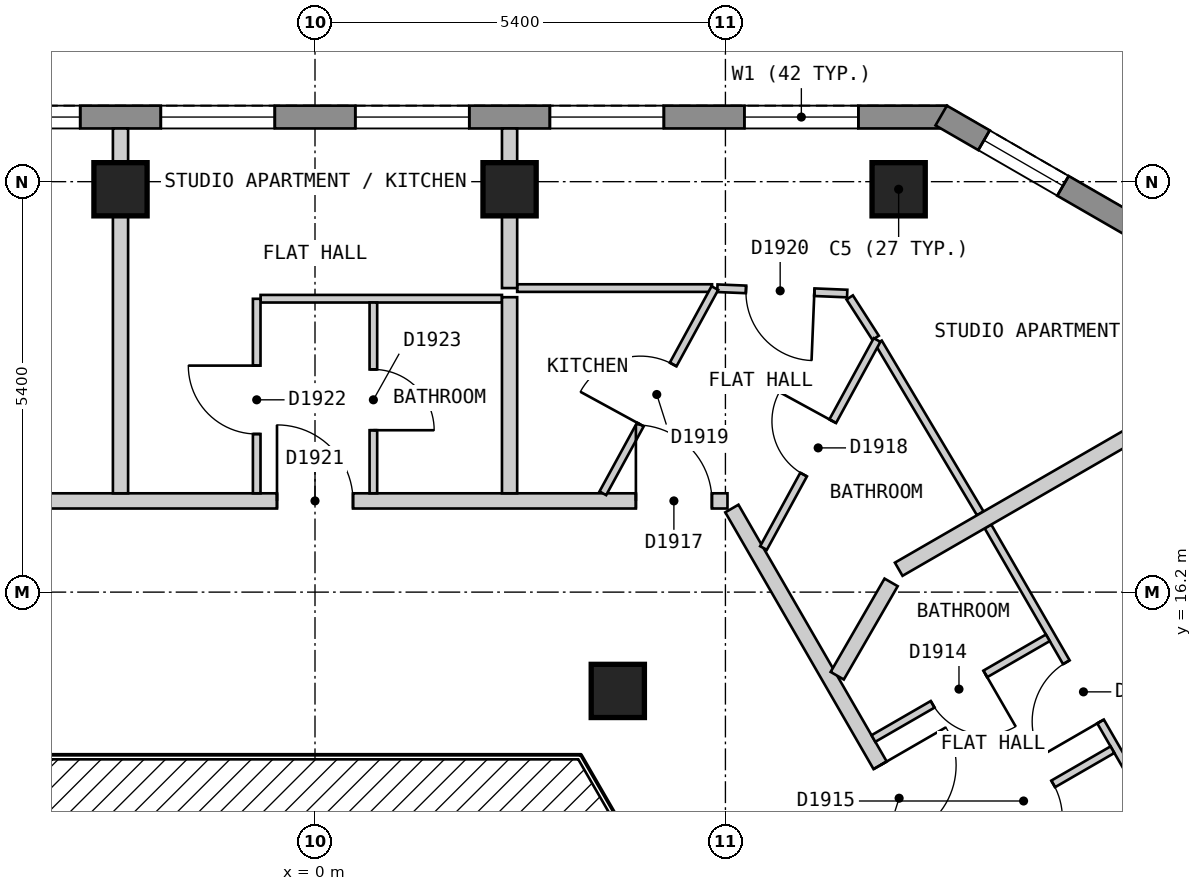
"""IFC4 building model, lengths in metres.
Left out: names, types, materials, properties, quantities, classifications, styles, units other than length and angle.
Written with IfcOpenShell. Run it as: python <this file> out.ifc"""

import sys

from ifc_helpers import new_model, si_unit, direction, frame, frame_2d, origin, origin_2d, place, context, subcontext, project, spatial, polyline, rectangle, outline, extrude, element, fill, save


model = new_model("IFC4")
c1 = context("Model", 3, precision=1e-05, world=origin(), true_north=direction((0.0, 1.0)))
c2 = subcontext(c1, "Body", "Model", "MODEL_VIEW")
j1 = project(units=[si_unit("LENGTHUNIT", "METRE"), si_unit("PLANEANGLEUNIT", "RADIAN")], contexts=[c1])
p1 = place(None, origin())
s1 = spatial("IfcSite", under=j1, at=p1, CompositionType="ELEMENT")
p2 = place(p1, origin())
s2 = spatial("IfcBuilding", under=s1, at=p2, CompositionType="ELEMENT")
p3 = place(p2, frame((0.0, 0.0, 220.8)))
s3 = spatial("IfcBuildingStorey", under=s2, at=p3, CompositionType="ELEMENT", Elevation=220.8)
for number, where, z_axis, x_axis in (
    (1, (7.679, 21.5, 0.0), (0.0, 0.0, 1.0), (-1.0, 0.0, 0.0)),
    (2, (2.56, 21.5, 0.0), (0.0, 0.0, 1.0), (-1.0, 0.0, 0.0)),
    (3, (-2.559, 21.5, 0.0), (0.0, 0.0, 1.0), (-1.0, 0.0, 0.0)),
    (4, (3.984, 14.9, 0.0), (0.0, 0.0, 1.0), (1.0, 0.0, 0.0)),
):
    element("IfcColumn", number, at=place(p3, frame(where, z_axis=z_axis, x_axis=x_axis)), inside=s3, PredefinedType="COLUMN", context=c2, shape_type="SweptSolid", body=[
        extrude(rectangle(XDim=0.7, YDim=0.7, at=origin_2d()), origin(), (0.0, 0.0, 1.0), 3.0),
    ])
p4 = place(p3, frame((8.314, 22.45, 0.0), z_axis=(0.0, 0.0, 1.0), x_axis=(-1.0, 0.0, 0.0)))
e5 = element("IfcWall", 5, at=p4, inside=s3, PredefinedType="SOLIDWALL", context=c2, shape_type="SweptSolid", body=[
    extrude(outline(polyline([(0.0, -0.15), (16.628, -0.15), (16.548, 0.15), (0.08, 0.15), (0.0, -0.15)])), origin(), (0.0, 0.0, 1.0), 2.7),
])
p5 = place(p4, frame((1.165, 0.0, 0.15)))
e6 = element("IfcOpeningElement", 6, at=p5, cuts=e5, PredefinedType="OPENING", context=c2, shape_type="SweptSolid", body=[
    extrude(rectangle(XDim=1.5, YDim=2.1, at=frame_2d((0.75, 1.05))), frame((0.0, 0.16, 0.0), z_axis=(0.0, -1.0, 0.0), x_axis=(1.0, 0.0, 0.0)), (0.0, 0.0, 1.0), 0.32),
])
p6 = place(p4, frame((3.724, 0.0, 0.15)))
e7 = element("IfcOpeningElement", 7, at=p6, cuts=e5, PredefinedType="OPENING", context=c2, shape_type="SweptSolid", body=[
    extrude(rectangle(XDim=1.5, YDim=2.1, at=frame_2d((0.75, 1.05))), frame((0.0, 0.16, 0.0), z_axis=(0.0, -1.0, 0.0), x_axis=(1.0, 0.0, 0.0)), (0.0, 0.0, 1.0), 0.32),
])
p7 = place(p4, frame((6.284, 0.0, 0.15)))
e8 = element("IfcOpeningElement", 8, at=p7, cuts=e5, PredefinedType="OPENING", context=c2, shape_type="SweptSolid", body=[
    extrude(rectangle(XDim=1.5, YDim=2.1, at=frame_2d((0.75, 1.05))), frame((0.0, 0.16, 0.0), z_axis=(0.0, -1.0, 0.0), x_axis=(1.0, 0.0, 0.0)), (0.0, 0.0, 1.0), 0.32),
])
p8 = place(p4, frame((8.843, 0.0, 0.15)))
e9 = element("IfcOpeningElement", 9, at=p8, cuts=e5, PredefinedType="OPENING", context=c2, shape_type="SweptSolid", body=[
    extrude(rectangle(XDim=1.5, YDim=2.1, at=frame_2d((0.75, 1.05))), frame((0.0, 0.16, 0.0), z_axis=(0.0, -1.0, 0.0), x_axis=(1.0, 0.0, 0.0)), (0.0, 0.0, 1.0), 0.32),
])
p9 = place(p4, frame((11.403, 0.0, 0.15)))
e10 = element("IfcOpeningElement", 10, at=p9, cuts=e5, PredefinedType="OPENING", context=c2, shape_type="SweptSolid", body=[
    extrude(rectangle(XDim=1.5, YDim=2.1, at=frame_2d((0.75, 1.05))), frame((0.0, 0.16, 0.0), z_axis=(0.0, -1.0, 0.0), x_axis=(1.0, 0.0, 0.0)), (0.0, 0.0, 1.0), 0.32),
])
p10 = place(p4, frame((13.962, 0.0, 0.15)))
e11 = element("IfcOpeningElement", 11, at=p10, cuts=e5, PredefinedType="OPENING", context=c2, shape_type="SweptSolid", body=[
    extrude(rectangle(XDim=1.5, YDim=2.1, at=frame_2d((0.75, 1.05))), frame((0.0, 0.16, 0.0), z_axis=(0.0, -1.0, 0.0), x_axis=(1.0, 0.0, 0.0)), (0.0, 0.0, 1.0), 0.32),
])
p11 = place(p3, frame((12.569, 19.97, 0.0), z_axis=(0.0, 0.0, 1.0), x_axis=(-0.866022959057, 0.500004234368, 0.0)))
e12 = element("IfcWall", 12, at=p11, inside=s3, PredefinedType="SOLIDWALL", context=c2, shape_type="SweptSolid", body=[
    extrude(outline(polyline([(0.0, -0.15), (5.0, -0.15), (4.92, 0.15), (0.08, 0.15), (0.0, -0.15)])), origin(), (0.0, 0.0, 1.0), 2.7),
])
p12 = place(p11, frame((0.65, 0.0, 0.15)))
e13 = element("IfcOpeningElement", 13, at=p12, cuts=e12, PredefinedType="OPENING", context=c2, shape_type="SweptSolid", body=[
    extrude(rectangle(XDim=1.2, YDim=2.1, at=frame_2d((0.6, 1.05))), frame((0.0, 0.16, 0.0), z_axis=(0.0, -1.0, 0.0), x_axis=(1.0, 0.0, 0.0)), (0.0, 0.0, 1.0), 0.32),
])
p13 = place(p11, frame((3.15, 0.0, 0.15)))
e14 = element("IfcOpeningElement", 14, at=p13, cuts=e12, PredefinedType="OPENING", context=c2, shape_type="SweptSolid", body=[
    extrude(rectangle(XDim=1.2, YDim=2.1, at=frame_2d((0.6, 1.05))), frame((0.0, 0.16, 0.0), z_axis=(0.0, -1.0, 0.0), x_axis=(1.0, 0.0, 0.0)), (0.0, 0.0, 1.0), 0.32),
])
p14 = place(p3, frame((5.485, 17.3, 0.0), z_axis=(0.0, 0.0, 1.0), x_axis=(0.499943285704, -0.866058145322, 0.0)))
e15 = element("IfcWall", 15, at=p14, inside=s3, PredefinedType="PARTITIONING", context=c2, shape_type="SweptSolid", body=[
    extrude(rectangle(XDim=10.623, YDim=0.2, at=frame_2d((5.312, 0.0))), origin(), (0.0, 0.0, 1.0), 2.7),
])
p15 = place(p14, frame((3.901, 0.0, 0.0)))
e16 = element("IfcOpeningElement", 16, at=p15, cuts=e15, PredefinedType="OPENING", context=c2, shape_type="SweptSolid", body=[
    extrude(rectangle(XDim=1.0, YDim=2.1, at=frame_2d((0.5, 1.05))), frame((0.0, 0.11, 0.0), z_axis=(0.0, -1.0, 0.0), x_axis=(1.0, 0.0, 0.0)), (0.0, 0.0, 1.0), 0.22),
])
p16 = place(p3, frame((-5.312, 17.4, 0.0), z_axis=(0.0, 0.0, 1.0), x_axis=(1.0, 0.0, 0.0)))
e17 = element("IfcWall", 17, at=p16, inside=s3, PredefinedType="PARTITIONING", context=c2, shape_type="SweptSolid", body=[
    extrude(rectangle(XDim=10.739, YDim=0.2, at=frame_2d((5.37, 0.0))), origin(), (0.0, 0.0, 1.0), 2.7),
])
p17 = place(p16, frame((9.534, 0.0, 0.0)))
e18 = element("IfcOpeningElement", 18, at=p17, cuts=e17, PredefinedType="OPENING", context=c2, shape_type="SweptSolid", body=[
    extrude(rectangle(XDim=1.0, YDim=2.1, at=frame_2d((0.5, 1.05))), frame((0.0, 0.11, 0.0), z_axis=(0.0, -1.0, 0.0), x_axis=(1.0, 0.0, 0.0)), (0.0, 0.0, 1.0), 0.22),
])
p18 = place(p16, frame((4.812, 0.0, 0.0)))
e19 = element("IfcOpeningElement", 19, at=p18, cuts=e17, PredefinedType="OPENING", context=c2, shape_type="SweptSolid", body=[
    extrude(rectangle(XDim=1.0, YDim=2.1, at=frame_2d((0.5, 1.05))), frame((0.0, 0.11, 0.0), z_axis=(0.0, -1.0, 0.0), x_axis=(1.0, 0.0, 0.0)), (0.0, 0.0, 1.0), 0.22),
])
p19 = place(p16, frame((0.208, 0.0, 0.0)))
e20 = element("IfcOpeningElement", 20, at=p19, cuts=e17, PredefinedType="OPENING", context=c2, shape_type="SweptSolid", body=[
    extrude(rectangle(XDim=0.8, YDim=2.1, at=frame_2d((0.4, 1.05))), frame((0.0, 0.11, 0.0), z_axis=(0.0, -1.0, 0.0), x_axis=(1.0, 0.0, 0.0)), (0.0, 0.0, 1.0), 0.22),
])
p20 = place(p3, frame((7.035, 20.077, 0.0), z_axis=(0.0, 0.0, 1.0), x_axis=(0.540425167977, -0.841392083286, 0.0)))
e21 = element("IfcWall", 21, at=p20, inside=s3, PredefinedType="PARTITIONING", context=c2, shape_type="SweptSolid", body=[
    extrude(rectangle(XDim=0.631, YDim=0.1, at=frame_2d((0.315, 0.0))), origin(), (0.0, 0.0, 1.0), 2.7),
])
p21 = place(p3, frame((7.414, 19.484, 0.0), z_axis=(0.0, 0.0, 1.0), x_axis=(0.511734837015, -0.859143443544, 0.0)))
e22 = element("IfcWall", 22, at=p21, inside=s3, PredefinedType="PARTITIONING", context=c2, shape_type="SweptSolid", body=[
    extrude(rectangle(XDim=2.616, YDim=0.1, at=frame_2d((1.308, 0.0))), origin(), (0.0, 0.0, 1.0), 2.7),
])
p22 = place(p3, frame((8.854, 17.064, 0.0), z_axis=(0.0, 0.0, 1.0), x_axis=(0.500042049778, -0.866001124973, 0.0)))
e23 = element("IfcWall", 23, at=p22, inside=s3, PredefinedType="PARTITIONING", context=c2, shape_type="SweptSolid", body=[
    extrude(rectangle(XDim=5.025, YDim=0.1, at=frame_2d((2.513, 0.0))), origin(), (0.0, 0.0, 1.0), 2.7),
])
p23 = place(p22, frame((2.063, 0.0, 0.0)))
e24 = element("IfcOpeningElement", 24, at=p23, cuts=e23, PredefinedType="OPENING", context=c2, shape_type="SweptSolid", body=[
    extrude(rectangle(XDim=0.9, YDim=2.1, at=frame_2d((0.45, 1.05))), frame((0.0, 0.06, 0.0), z_axis=(0.0, -1.0, 0.0), x_axis=(1.0, 0.0, 0.0)), (0.0, 0.0, 1.0), 0.12),
])
p24 = place(p3, frame((5.294, 20.198, 0.0), z_axis=(0.0, 0.0, 1.0), x_axis=(0.999159599203, -0.040988965834, 0.0)))
e25 = element("IfcWall", 25, at=p24, inside=s3, PredefinedType="PARTITIONING", context=c2, shape_type="SweptSolid", body=[
    extrude(rectangle(XDim=1.709, YDim=0.1, at=frame_2d((0.855, 0.0))), origin(), (0.0, 0.0, 1.0), 2.7),
])
p25 = place(p24, frame((0.377, 0.0, 0.0)))
e26 = element("IfcOpeningElement", 26, at=p25, cuts=e25, PredefinedType="OPENING", context=c2, shape_type="SweptSolid", body=[
    extrude(rectangle(XDim=0.9, YDim=2.1, at=frame_2d((0.45, 1.05))), frame((0.0, 0.06, 0.0), z_axis=(0.0, -1.0, 0.0), x_axis=(1.0, 0.0, 0.0)), (0.0, 0.0, 1.0), 0.12),
])
p26 = place(p3, frame((-0.716, 20.06, 0.0), z_axis=(0.0, 0.0, 1.0), x_axis=(1.0, 0.0, 0.0)))
e27 = element("IfcWall", 27, at=p26, inside=s3, PredefinedType="PARTITIONING", context=c2, shape_type="SweptSolid", body=[
    extrude(rectangle(XDim=3.176, YDim=0.1, at=frame_2d((1.588, 0.0))), origin(), (0.0, 0.0, 1.0), 2.7),
])
p27 = place(p3, frame((2.66, 20.2, 0.0), z_axis=(0.0, 0.0, 1.0), x_axis=(1.0, 0.0, 0.0)))
e28 = element("IfcWall", 28, at=p27, inside=s3, PredefinedType="PARTITIONING", context=c2, shape_type="SweptSolid", body=[
    extrude(rectangle(XDim=2.564, YDim=0.1, at=frame_2d((1.282, 0.0))), origin(), (0.0, 0.0, 1.0), 2.7),
])
p28 = place(p3, frame((3.787, 17.5, 0.0), z_axis=(0.0, 0.0, 1.0), x_axis=(0.479146828267, 0.877734764585, 0.0)))
e29 = element("IfcWall", 29, at=p28, inside=s3, PredefinedType="PARTITIONING", context=c2, shape_type="SweptSolid", body=[
    extrude(rectangle(XDim=3.076, YDim=0.1, at=frame_2d((1.538, 0.0))), origin(), (0.0, 0.0, 1.0), 2.7),
])
p29 = place(p28, frame((1.031, 0.0, 0.0)))
e30 = element("IfcOpeningElement", 30, at=p29, cuts=e29, PredefinedType="OPENING", context=c2, shape_type="SweptSolid", body=[
    extrude(rectangle(XDim=0.9, YDim=2.1, at=frame_2d((0.45, 1.05))), frame((0.0, 0.06, 0.0), z_axis=(0.0, -1.0, 0.0), x_axis=(1.0, 0.0, 0.0)), (0.0, 0.0, 1.0), 0.12),
])
p30 = place(p3, frame((5.901, 16.78, 0.0), z_axis=(0.0, 0.0, 1.0), x_axis=(0.479148317257, 0.877733951759, 0.0)))
e31 = element("IfcWall", 31, at=p30, inside=s3, PredefinedType="PARTITIONING", context=c2, shape_type="SweptSolid", body=[
    extrude(rectangle(XDim=3.118, YDim=0.1, at=frame_2d((1.559, 0.0))), origin(), (0.0, 0.0, 1.0), 2.7),
])
p31 = place(p30, frame((1.101, 0.0, 0.0)))
e32 = element("IfcOpeningElement", 32, at=p31, cuts=e31, PredefinedType="OPENING", context=c2, shape_type="SweptSolid", body=[
    extrude(rectangle(XDim=0.8, YDim=2.1, at=frame_2d((0.4, 1.05))), frame((0.0, 0.06, 0.0), z_axis=(0.0, -1.0, 0.0), x_axis=(1.0, 0.0, 0.0)), (0.0, 0.0, 1.0), 0.12),
])
p32 = place(p3, frame((0.768, 17.5, 0.0), z_axis=(0.0, 0.0, 1.0), x_axis=(0.0, 1.0, 0.0)))
e33 = element("IfcWall", 33, at=p32, inside=s3, PredefinedType="PARTITIONING", context=c2, shape_type="SweptSolid", body=[
    extrude(rectangle(XDim=2.51, YDim=0.1, at=frame_2d((1.255, 0.0))), origin(), (0.0, 0.0, 1.0), 2.7),
])
p33 = place(p32, frame((0.83, 0.0, 0.0)))
e34 = element("IfcOpeningElement", 34, at=p33, cuts=e33, PredefinedType="OPENING", context=c2, shape_type="SweptSolid", body=[
    extrude(rectangle(XDim=0.8, YDim=2.1, at=frame_2d((0.4, 1.05))), frame((0.0, 0.06, 0.0), z_axis=(0.0, -1.0, 0.0), x_axis=(1.0, 0.0, 0.0)), (0.0, 0.0, 1.0), 0.12),
])
p34 = place(p3, frame((-0.767, 17.5, 0.0), z_axis=(0.0, 0.0, 1.0), x_axis=(0.0, 1.0, 0.0)))
e35 = element("IfcWall", 35, at=p34, inside=s3, PredefinedType="PARTITIONING", context=c2, shape_type="SweptSolid", body=[
    extrude(rectangle(XDim=2.559, YDim=0.1, at=frame_2d((1.28, 0.0))), origin(), (0.0, 0.0, 1.0), 2.7),
])
p35 = place(p34, frame((0.78, 0.0, 0.0)))
e36 = element("IfcOpeningElement", 36, at=p35, cuts=e35, PredefinedType="OPENING", context=c2, shape_type="SweptSolid", body=[
    extrude(rectangle(XDim=0.9, YDim=2.1, at=frame_2d((0.45, 1.05))), frame((0.0, 0.06, 0.0), z_axis=(0.0, -1.0, 0.0), x_axis=(1.0, 0.0, 0.0)), (0.0, 0.0, 1.0), 0.12),
])
p36 = place(p3, frame((8.197, 12.802, 0.0), z_axis=(0.0, 0.0, 1.0), x_axis=(0.866029095148, 0.499993606316, 0.0)))
e37 = element("IfcWall", 37, at=p36, inside=s3, PredefinedType="PARTITIONING", context=c2, shape_type="SweptSolid", body=[
    extrude(rectangle(XDim=2.65, YDim=0.1, at=frame_2d((1.325, 0.0))), origin(), (0.0, 0.0, 1.0), 2.7),
])
p37 = place(p36, frame((0.85, 0.0, 0.0)))
e38 = element("IfcOpeningElement", 38, at=p37, cuts=e37, PredefinedType="OPENING", context=c2, shape_type="SweptSolid", body=[
    extrude(rectangle(XDim=0.9, YDim=2.1, at=frame_2d((0.45, 1.05))), frame((0.0, 0.06, 0.0), z_axis=(0.0, -1.0, 0.0), x_axis=(1.0, 0.0, 0.0)), (0.0, 0.0, 1.0), 0.12),
])
p38 = place(p3, frame((7.347, 14.274, 0.0), z_axis=(0.0, 0.0, 1.0), x_axis=(0.86601223543, 0.500022807565, 0.0)))
e39 = element("IfcWall", 39, at=p38, inside=s3, PredefinedType="PARTITIONING", context=c2, shape_type="SweptSolid", body=[
    extrude(rectangle(XDim=2.65, YDim=0.1, at=frame_2d((1.325, 0.0))), origin(), (0.0, 0.0, 1.0), 2.7),
])
p39 = place(p38, frame((0.9, 0.0, 0.0)))
e40 = element("IfcOpeningElement", 40, at=p39, cuts=e39, PredefinedType="OPENING", context=c2, shape_type="SweptSolid", body=[
    extrude(rectangle(XDim=0.8, YDim=2.1, at=frame_2d((0.4, 1.05))), frame((0.0, 0.06, 0.0), z_axis=(0.0, -1.0, 0.0), x_axis=(1.0, 0.0, 0.0)), (0.0, 0.0, 1.0), 0.12),
])
p40 = place(p3, frame((-2.559, 22.3, 0.0), z_axis=(0.0, 0.0, 1.0), x_axis=(0.0, -1.0, 0.0)))
e41 = element("IfcWall", 41, at=p40, inside=s3, PredefinedType="PARTITIONING", context=c2, shape_type="SweptSolid", body=[
    extrude(rectangle(XDim=4.8, YDim=0.2, at=frame_2d((2.4, 0.0))), origin(), (0.0, 0.0, 1.0), 2.7),
])
p41 = place(p3, frame((2.56, 20.08, 0.0), z_axis=(0.0, 0.0, 1.0), x_axis=(0.0, -1.0, 0.0)))
e42 = element("IfcWall", 42, at=p41, inside=s3, PredefinedType="PARTITIONING", context=c2, shape_type="SweptSolid", body=[
    extrude(rectangle(XDim=2.58, YDim=0.2, at=frame_2d((1.29, 0.0))), origin(), (0.0, 0.0, 1.0), 2.7),
])
p42 = place(p3, frame((6.871, 15.1, 0.0), z_axis=(0.0, 0.0, 1.0), x_axis=(0.50006528296, 0.865987709369, 0.0)))
e43 = element("IfcWall", 43, at=p42, inside=s3, PredefinedType="PARTITIONING", context=c2, shape_type="SweptSolid", body=[
    extrude(rectangle(XDim=1.418, YDim=0.2, at=frame_2d((0.709, 0.0))), origin(), (0.0, 0.0, 1.0), 2.7),
])
p43 = place(p3, frame((2.56, 20.2, 0.0), z_axis=(0.0, 0.0, 1.0), x_axis=(0.0, 1.0, 0.0)))
e44 = element("IfcWall", 44, at=p43, inside=s3, PredefinedType="PARTITIONING", context=c2, shape_type="SweptSolid", body=[
    extrude(rectangle(XDim=2.1, YDim=0.2, at=frame_2d((1.05, 0.0))), origin(), (0.0, 0.0, 1.0), 2.7),
])
p44 = place(p3, frame((7.68, 16.501, 0.0), z_axis=(0.0, 0.0, 1.0), x_axis=(0.86602149507, 0.500006770031, 0.0)))
e45 = element("IfcWall", 45, at=p44, inside=s3, PredefinedType="PARTITIONING", context=c2, shape_type="SweptSolid", body=[
    extrude(rectangle(XDim=5.798, YDim=0.2, at=frame_2d((2.899, 0.0))), origin(), (0.0, 0.0, 1.0), 2.7),
])
p45 = place(p5, origin())
e46 = element("IfcWindow", 46, at=p45, inside=s3, PartitioningType="SINGLE_PANEL", PredefinedType="WINDOW", context=c2, shape_type="SweptSolid", body=[
    extrude(rectangle(XDim=1.5, YDim=2.1, at=frame_2d((0.75, 1.05))), frame((0.0, 0.03, 0.0), z_axis=(0.0, -1.0, 0.0), x_axis=(1.0, 0.0, 0.0)), (0.0, 0.0, 1.0), 0.06),
])
fill(e6, e46)
p46 = place(p6, origin())
e47 = element("IfcWindow", 47, at=p46, inside=s3, PartitioningType="SINGLE_PANEL", PredefinedType="WINDOW", context=c2, shape_type="SweptSolid", body=[
    extrude(rectangle(XDim=1.5, YDim=2.1, at=frame_2d((0.75, 1.05))), frame((0.0, 0.03, 0.0), z_axis=(0.0, -1.0, 0.0), x_axis=(1.0, 0.0, 0.0)), (0.0, 0.0, 1.0), 0.06),
])
fill(e7, e47)
p47 = place(p7, origin())
e48 = element("IfcWindow", 48, at=p47, inside=s3, PartitioningType="SINGLE_PANEL", PredefinedType="WINDOW", context=c2, shape_type="SweptSolid", body=[
    extrude(rectangle(XDim=1.5, YDim=2.1, at=frame_2d((0.75, 1.05))), frame((0.0, 0.03, 0.0), z_axis=(0.0, -1.0, 0.0), x_axis=(1.0, 0.0, 0.0)), (0.0, 0.0, 1.0), 0.06),
])
fill(e8, e48)
p48 = place(p8, origin())
e49 = element("IfcWindow", 49, at=p48, inside=s3, PartitioningType="SINGLE_PANEL", PredefinedType="WINDOW", context=c2, shape_type="SweptSolid", body=[
    extrude(rectangle(XDim=1.5, YDim=2.1, at=frame_2d((0.75, 1.05))), frame((0.0, 0.03, 0.0), z_axis=(0.0, -1.0, 0.0), x_axis=(1.0, 0.0, 0.0)), (0.0, 0.0, 1.0), 0.06),
])
fill(e9, e49)
p49 = place(p9, origin())
e50 = element("IfcWindow", 50, at=p49, inside=s3, PartitioningType="SINGLE_PANEL", PredefinedType="WINDOW", context=c2, shape_type="SweptSolid", body=[
    extrude(rectangle(XDim=1.5, YDim=2.1, at=frame_2d((0.75, 1.05))), frame((0.0, 0.03, 0.0), z_axis=(0.0, -1.0, 0.0), x_axis=(1.0, 0.0, 0.0)), (0.0, 0.0, 1.0), 0.06),
])
fill(e10, e50)
p50 = place(p13, origin())
e51 = element("IfcWindow", 51, at=p50, inside=s3, PartitioningType="SINGLE_PANEL", PredefinedType="WINDOW", context=c2, shape_type="SweptSolid", body=[
    extrude(rectangle(XDim=1.2, YDim=2.1, at=frame_2d((0.6, 1.05))), frame((0.0, 0.03, 0.0), z_axis=(0.0, -1.0, 0.0), x_axis=(1.0, 0.0, 0.0)), (0.0, 0.0, 1.0), 0.06),
])
fill(e14, e51)
p51 = place(p15, origin())
e52 = element("IfcDoor", 52, at=p51, inside=s3, OperationType="SINGLE_SWING_LEFT", PredefinedType="DOOR", context=c2, shape_type="SweptSolid", body=[
    extrude(rectangle(XDim=1.0, YDim=2.1, at=frame_2d((0.5, 1.05))), frame((0.0, 0.025, 0.0), z_axis=(0.0, -1.0, 0.0), x_axis=(1.0, 0.0, 0.0)), (0.0, 0.0, 1.0), 0.05),
])
fill(e16, e52)
p52 = place(p39, origin())
e53 = element("IfcDoor", 53, at=p52, inside=s3, OperationType="SINGLE_SWING_RIGHT", PredefinedType="DOOR", context=c2, shape_type="SweptSolid", body=[
    extrude(rectangle(XDim=0.8, YDim=2.1, at=frame_2d((0.4, 1.05))), frame((0.0, 0.025, 0.0), z_axis=(0.0, -1.0, 0.0), x_axis=(1.0, 0.0, 0.0)), (0.0, 0.0, 1.0), 0.05),
])
fill(e40, e53)
p53 = place(p37, origin())
e54 = element("IfcDoor", 54, at=p53, inside=s3, OperationType="SINGLE_SWING_LEFT", PredefinedType="DOOR", context=c2, shape_type="SweptSolid", body=[
    extrude(rectangle(XDim=0.9, YDim=2.1, at=frame_2d((0.45, 1.05))), frame((0.0, 0.025, 0.0), z_axis=(0.0, -1.0, 0.0), x_axis=(1.0, 0.0, 0.0)), (0.0, 0.0, 1.0), 0.05),
])
fill(e38, e54)
p54 = place(p23, origin())
e55 = element("IfcDoor", 55, at=p54, inside=s3, OperationType="SINGLE_SWING_RIGHT", PredefinedType="DOOR", context=c2, shape_type="SweptSolid", body=[
    extrude(rectangle(XDim=0.9, YDim=2.1, at=frame_2d((0.45, 1.05))), frame((0.0, 0.025, 0.0), z_axis=(0.0, -1.0, 0.0), x_axis=(1.0, 0.0, 0.0)), (0.0, 0.0, 1.0), 0.05),
])
fill(e24, e55)
p55 = place(p17, origin())
e56 = element("IfcDoor", 56, at=p55, inside=s3, OperationType="SINGLE_SWING_LEFT", PredefinedType="DOOR", context=c2, shape_type="SweptSolid", body=[
    extrude(rectangle(XDim=1.0, YDim=2.1, at=frame_2d((0.5, 1.05))), frame((0.0, 0.025, 0.0), z_axis=(0.0, -1.0, 0.0), x_axis=(1.0, 0.0, 0.0)), (0.0, 0.0, 1.0), 0.05),
])
fill(e18, e56)
p56 = place(p31, origin())
e57 = element("IfcDoor", 57, at=p56, inside=s3, OperationType="SINGLE_SWING_RIGHT", PredefinedType="DOOR", context=c2, shape_type="SweptSolid", body=[
    extrude(rectangle(XDim=0.8, YDim=2.1, at=frame_2d((0.4, 1.05))), frame((0.0, 0.025, 0.0), z_axis=(0.0, -1.0, 0.0), x_axis=(1.0, 0.0, 0.0)), (0.0, 0.0, 1.0), 0.05),
])
fill(e32, e57)
p57 = place(p29, origin())
e58 = element("IfcDoor", 58, at=p57, inside=s3, OperationType="SINGLE_SWING_LEFT", PredefinedType="DOOR", context=c2, shape_type="SweptSolid", body=[
    extrude(rectangle(XDim=0.9, YDim=2.1, at=frame_2d((0.45, 1.05))), frame((0.0, 0.025, 0.0), z_axis=(0.0, -1.0, 0.0), x_axis=(1.0, 0.0, 0.0)), (0.0, 0.0, 1.0), 0.05),
])
fill(e30, e58)
p58 = place(p25, origin())
e59 = element("IfcDoor", 59, at=p58, inside=s3, OperationType="SINGLE_SWING_RIGHT", PredefinedType="DOOR", context=c2, shape_type="SweptSolid", body=[
    extrude(rectangle(XDim=0.9, YDim=2.1, at=frame_2d((0.45, 1.05))), frame((0.0, 0.025, 0.0), z_axis=(0.0, -1.0, 0.0), x_axis=(1.0, 0.0, 0.0)), (0.0, 0.0, 1.0), 0.05),
])
fill(e26, e59)
p59 = place(p18, origin())
e60 = element("IfcDoor", 60, at=p59, inside=s3, OperationType="SINGLE_SWING_LEFT", PredefinedType="DOOR", context=c2, shape_type="SweptSolid", body=[
    extrude(rectangle(XDim=1.0, YDim=2.1, at=frame_2d((0.5, 1.05))), frame((0.0, 0.025, 0.0), z_axis=(0.0, -1.0, 0.0), x_axis=(1.0, 0.0, 0.0)), (0.0, 0.0, 1.0), 0.05),
])
fill(e19, e60)
p60 = place(p35, origin())
e61 = element("IfcDoor", 61, at=p60, inside=s3, OperationType="SINGLE_SWING_RIGHT", PredefinedType="DOOR", context=c2, shape_type="SweptSolid", body=[
    extrude(rectangle(XDim=0.9, YDim=2.1, at=frame_2d((0.45, 1.05))), frame((0.0, 0.025, 0.0), z_axis=(0.0, -1.0, 0.0), x_axis=(1.0, 0.0, 0.0)), (0.0, 0.0, 1.0), 0.05),
])
fill(e36, e61)
p61 = place(p33, origin())
e62 = element("IfcDoor", 62, at=p61, inside=s3, OperationType="SINGLE_SWING_LEFT", PredefinedType="DOOR", context=c2, shape_type="SweptSolid", body=[
    extrude(rectangle(XDim=0.8, YDim=2.1, at=frame_2d((0.4, 1.05))), frame((0.0, 0.025, 0.0), z_axis=(0.0, -1.0, 0.0), x_axis=(1.0, 0.0, 0.0)), (0.0, 0.0, 1.0), 0.05),
])
fill(e34, e62)
save(model, sys.argv[1])
